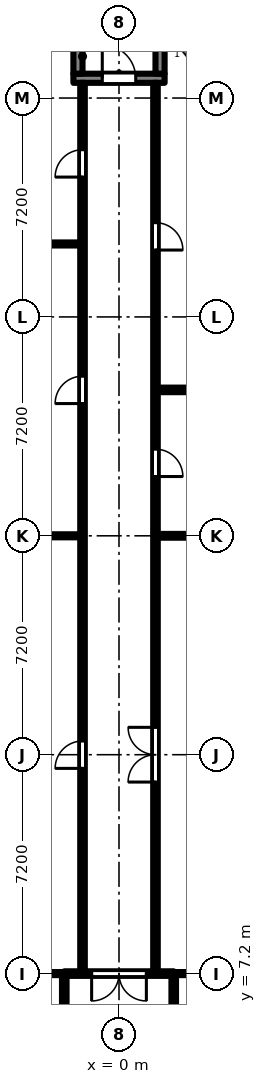
"""IFC4 building model, lengths in metres.
Left out: names, types, materials, properties, quantities, classifications, styles, units other than length and angle.
Written with IfcOpenShell. Run it as: python <this file> out.ifc"""

import sys

from ifc_helpers import new_model, si_unit, direction, frame, frame_2d, origin, place, context, subcontext, project, spatial, rectangle, extrude, element, fill, save


model = new_model("IFC4")
c1 = context("Model", 3, precision=1e-05, world=origin(), true_north=direction((0.0, 1.0)))
c2 = subcontext(c1, "Body", "Model", "MODEL_VIEW")
j1 = project(units=[si_unit("LENGTHUNIT", "METRE"), si_unit("PLANEANGLEUNIT", "RADIAN")], contexts=[c1])
p1 = place(None, origin())
s1 = spatial("IfcSite", under=j1, at=p1, CompositionType="ELEMENT")
p2 = place(p1, origin())
s2 = spatial("IfcBuilding", under=s1, at=p2, CompositionType="ELEMENT")
p3 = place(p2, frame((0.0, 0.0, 7.2)))
s3 = spatial("IfcBuildingStorey", under=s2, at=p3, CompositionType="ELEMENT", Elevation=7.2)
p4 = place(p3, frame((-1.5, 36.65, 0.0), z_axis=(0.0, 0.0, 1.0), x_axis=(1.0, 0.0, 0.0)))
e1 = element("IfcWall", 1, at=p4, inside=s3, PredefinedType="SHEAR", context=c2, shape_type="SweptSolid", body=[
    extrude(rectangle(XDim=3.0, YDim=0.3, at=frame_2d((1.5, 0.0))), origin(), (0.0, 0.0, 1.0), 4.075),
])
p5 = place(p4, frame((0.95, 0.0, 0.0)))
e2 = element("IfcOpeningElement", 2, at=p5, cuts=e1, PredefinedType="OPENING", context=c2, shape_type="SweptSolid", body=[
    extrude(rectangle(XDim=1.1, YDim=2.1, at=frame_2d((0.55, 1.05))), frame((0.0, 0.16, 0.0), z_axis=(0.0, -1.0, 0.0), x_axis=(1.0, 0.0, 0.0)), (0.0, 0.0, 1.0), 0.32),
])
for number, where, z_axis, x_axis in (
    (3, (-1.35, 36.8, 0.0), (0.0, 0.0, 1.0), (0.0, 1.0, 0.0)),
    (4, (1.35, 36.8, 0.0), (0.0, 0.0, 1.0), (0.0, 1.0, 0.0)),
):
    element("IfcWall", number, at=place(p3, frame(where, z_axis=z_axis, x_axis=x_axis)), inside=s3, PredefinedType="SHEAR", context=c2, shape_type="SweptSolid", body=[
        extrude(rectangle(XDim=5.8, YDim=0.3, at=frame_2d((2.9, 0.0))), origin(), (0.0, 0.0, 1.0), 4.075),
    ])
p6 = place(p3, frame((-6.9, 21.6, 0.0), z_axis=(0.0, 0.0, 1.0), x_axis=(1.0, 0.0, 0.0)))
e5 = element("IfcWall", 5, at=p6, inside=s3, PredefinedType="PARTITIONING", context=c2, shape_type="SweptSolid", body=[
    extrude(rectangle(XDim=5.625, YDim=0.1, at=frame_2d((2.812, 0.0))), origin(), (0.0, 0.0, 1.0), 4.075),
])
p7 = place(p3, frame((-7.02, 31.2, 0.0), z_axis=(0.0, 0.0, 1.0), x_axis=(1.0, 0.0, 0.0)))
e6 = element("IfcWall", 6, at=p7, inside=s3, PredefinedType="PARTITIONING", context=c2, shape_type="SweptSolid", body=[
    extrude(rectangle(XDim=5.745, YDim=0.1, at=frame_2d((2.873, 0.0))), origin(), (0.0, 0.0, 1.0), 4.075),
])
p8 = place(p3, frame((-1.8, 1.875, 0.0), z_axis=(0.0, 0.0, 1.0), x_axis=(0.0, 1.0, 0.0)))
e7 = element("IfcWall", 7, at=p8, inside=s3, PredefinedType="PARTITIONING", context=c2, shape_type="SweptSolid", body=[
    extrude(rectangle(XDim=5.25, YDim=0.15, at=frame_2d((2.625, 0.0))), origin(), (0.0, 0.0, 1.0), 4.075),
])
p9 = place(p8, frame((0.555, 0.0, 0.0)))
e8 = element("IfcOpeningElement", 8, at=p9, cuts=e7, PredefinedType="OPENING", context=c2, shape_type="SweptSolid", body=[
    extrude(rectangle(XDim=0.9, YDim=2.1, at=frame_2d((0.45, 1.05))), frame((0.0, 0.085, 0.0), z_axis=(0.0, -1.0, 0.0), x_axis=(1.0, 0.0, 0.0)), (0.0, 0.0, 1.0), 0.17),
])
p10 = place(p3, frame((-1.8, 7.2, 0.0), z_axis=(0.0, 0.0, 1.0), x_axis=(1.0, 0.0, 0.0)))
e9 = element("IfcWall", 9, at=p10, inside=s3, PredefinedType="PARTITIONING", context=c2, shape_type="SweptSolid", body=[
    extrude(rectangle(XDim=3.6, YDim=0.15, at=frame_2d((1.8, 0.0))), origin(), (0.0, 0.0, 1.0), 4.075),
])
p11 = place(p10, frame((0.9, 0.0, 0.0)))
e10 = element("IfcOpeningElement", 10, at=p11, cuts=e9, PredefinedType="OPENING", context=c2, shape_type="SweptSolid", body=[
    extrude(rectangle(XDim=1.8, YDim=2.1, at=frame_2d((0.9, 1.05))), frame((0.0, 0.085, 0.0), z_axis=(0.0, -1.0, 0.0), x_axis=(1.0, 0.0, 0.0)), (0.0, 0.0, 1.0), 0.17),
])
p12 = place(p3, frame((-1.2, 7.275, 0.0), z_axis=(0.0, 0.0, 1.0), x_axis=(0.0, 1.0, 0.0)))
e11 = element("IfcWall", 11, at=p12, inside=s3, PredefinedType="PARTITIONING", context=c2, shape_type="SweptSolid", body=[
    extrude(rectangle(XDim=29.225, YDim=0.15, at=frame_2d((14.613, 0.0))), origin(), (0.0, 0.0, 1.0), 4.075),
])
p13 = place(p12, frame((6.675, 0.0, 0.0)))
e12 = element("IfcOpeningElement", 12, at=p13, cuts=e11, PredefinedType="OPENING", context=c2, shape_type="SweptSolid", body=[
    extrude(rectangle(XDim=0.9, YDim=2.1, at=frame_2d((0.45, 1.05))), frame((0.0, 0.085, 0.0), z_axis=(0.0, -1.0, 0.0), x_axis=(1.0, 0.0, 0.0)), (0.0, 0.0, 1.0), 0.17),
])
p14 = place(p12, frame((18.675, 0.0, 0.0)))
e13 = element("IfcOpeningElement", 13, at=p14, cuts=e11, PredefinedType="OPENING", context=c2, shape_type="SweptSolid", body=[
    extrude(rectangle(XDim=0.9, YDim=2.1, at=frame_2d((0.45, 1.05))), frame((0.0, 0.085, 0.0), z_axis=(0.0, -1.0, 0.0), x_axis=(1.0, 0.0, 0.0)), (0.0, 0.0, 1.0), 0.17),
])
p15 = place(p12, frame((26.125, 0.0, 0.0)))
e14 = element("IfcOpeningElement", 14, at=p15, cuts=e11, PredefinedType="OPENING", context=c2, shape_type="SweptSolid", body=[
    extrude(rectangle(XDim=0.9, YDim=2.1, at=frame_2d((0.45, 1.05))), frame((0.0, 0.085, 0.0), z_axis=(0.0, -1.0, 0.0), x_axis=(1.0, 0.0, 0.0)), (0.0, 0.0, 1.0), 0.17),
])
p16 = place(p3, frame((1.2, 7.275, 0.0), z_axis=(0.0, 0.0, 1.0), x_axis=(0.0, 1.0, 0.0)))
e15 = element("IfcWall", 15, at=p16, inside=s3, PredefinedType="PARTITIONING", context=c2, shape_type="SweptSolid", body=[
    extrude(rectangle(XDim=29.225, YDim=0.15, at=frame_2d((14.613, 0.0))), origin(), (0.0, 0.0, 1.0), 4.075),
])
p17 = place(p16, frame((6.225, 0.0, 0.0)))
e16 = element("IfcOpeningElement", 16, at=p17, cuts=e15, PredefinedType="OPENING", context=c2, shape_type="SweptSolid", body=[
    extrude(rectangle(XDim=1.8, YDim=2.1, at=frame_2d((0.9, 1.05))), frame((0.0, 0.085, 0.0), z_axis=(0.0, -1.0, 0.0), x_axis=(1.0, 0.0, 0.0)), (0.0, 0.0, 1.0), 0.17),
])
p18 = place(p16, frame((16.275, 0.0, 0.0)))
e17 = element("IfcOpeningElement", 17, at=p18, cuts=e15, PredefinedType="OPENING", context=c2, shape_type="SweptSolid", body=[
    extrude(rectangle(XDim=0.9, YDim=2.1, at=frame_2d((0.45, 1.05))), frame((0.0, 0.085, 0.0), z_axis=(0.0, -1.0, 0.0), x_axis=(1.0, 0.0, 0.0)), (0.0, 0.0, 1.0), 0.17),
])
p19 = place(p16, frame((23.725, 0.0, 0.0)))
e18 = element("IfcOpeningElement", 18, at=p19, cuts=e15, PredefinedType="OPENING", context=c2, shape_type="SweptSolid", body=[
    extrude(rectangle(XDim=0.9, YDim=2.1, at=frame_2d((0.45, 1.05))), frame((0.0, 0.085, 0.0), z_axis=(0.0, -1.0, 0.0), x_axis=(1.0, 0.0, 0.0)), (0.0, 0.0, 1.0), 0.17),
])
p20 = place(p3, frame((1.275, 21.6, 0.0), z_axis=(0.0, 0.0, 1.0), x_axis=(1.0, 0.0, 0.0)))
e19 = element("IfcWall", 19, at=p20, inside=s3, PredefinedType="PARTITIONING", context=c2, shape_type="SweptSolid", body=[
    extrude(rectangle(XDim=5.625, YDim=0.125, at=frame_2d((2.812, 0.0))), origin(), (0.0, 0.0, 1.0), 4.075),
])
p21 = place(p3, frame((1.275, 26.4, 0.0), z_axis=(0.0, 0.0, 1.0), x_axis=(1.0, 0.0, 0.0)))
e20 = element("IfcWall", 20, at=p21, inside=s3, PredefinedType="PARTITIONING", context=c2, shape_type="SweptSolid", body=[
    extrude(rectangle(XDim=5.745, YDim=0.15, at=frame_2d((2.873, 0.0))), origin(), (0.0, 0.0, 1.0), 4.075),
])
p22 = place(p3, frame((1.8, 1.725, 0.0), z_axis=(0.0, 0.0, 1.0), x_axis=(0.0, 1.0, 0.0)))
e21 = element("IfcWall", 21, at=p22, inside=s3, PredefinedType="PARTITIONING", context=c2, shape_type="SweptSolid", body=[
    extrude(rectangle(XDim=5.4, YDim=0.15, at=frame_2d((2.7, 0.0))), origin(), (0.0, 0.0, 1.0), 4.075),
])
p23 = place(p22, frame((0.175, 0.0, 0.0)))
e22 = element("IfcOpeningElement", 22, at=p23, cuts=e21, PredefinedType="OPENING", context=c2, shape_type="SweptSolid", body=[
    extrude(rectangle(XDim=0.9, YDim=2.1, at=frame_2d((0.45, 1.05))), frame((0.0, 0.085, 0.0), z_axis=(0.0, -1.0, 0.0), x_axis=(1.0, 0.0, 0.0)), (0.0, 0.0, 1.0), 0.17),
])
for number, where, z_axis, x_axis in (
    (23, (1.8, 7.2, 0.0), (0.0, 0.0, 1.0), (1.0, 0.0, 0.0)),
    (24, (-3.75, 7.2, 0.0), (0.0, 0.0, 1.0), (1.0, 0.0, 0.0)),
):
    element("IfcWall", number, at=place(p3, frame(where, z_axis=z_axis, x_axis=x_axis)), inside=s3, PredefinedType="PARTITIONING", context=c2, shape_type="SweptSolid", body=[
        extrude(rectangle(XDim=1.95, YDim=0.1, at=frame_2d((0.975, 0.0))), origin(), (0.0, 0.0, 1.0), 4.075),
    ])
p24 = place(p5, origin())
e25 = element("IfcDoor", 25, at=p24, inside=s3, OperationType="SINGLE_SWING_LEFT", PredefinedType="DOOR", context=c2, shape_type="SweptSolid", body=[
    extrude(rectangle(XDim=1.1, YDim=2.1, at=frame_2d((0.55, 1.05))), frame((0.0, 0.025, 0.0), z_axis=(0.0, -1.0, 0.0), x_axis=(1.0, 0.0, 0.0)), (0.0, 0.0, 1.0), 0.05),
])
fill(e2, e25)
p25 = place(p11, frame((1.8, 0.0, 0.0), z_axis=(0.0, 0.0, 1.0), x_axis=(-1.0, 0.0, 0.0)))
e26 = element("IfcDoor", 26, at=p25, inside=s3, OperationType="DOUBLE_DOOR_DOUBLE_SWING", PredefinedType="DOOR", context=c2, shape_type="SweptSolid", body=[
    extrude(rectangle(XDim=1.8, YDim=2.1, at=frame_2d((0.9, 1.05))), frame((0.0, 0.025, 0.0), z_axis=(0.0, -1.0, 0.0), x_axis=(1.0, 0.0, 0.0)), (0.0, 0.0, 1.0), 0.05),
])
fill(e10, e26)
p26 = place(p13, origin())
e27 = element("IfcDoor", 27, at=p26, inside=s3, OperationType="SINGLE_SWING_LEFT", PredefinedType="DOOR", context=c2, shape_type="SweptSolid", body=[
    extrude(rectangle(XDim=0.9, YDim=2.1, at=frame_2d((0.45, 1.05))), frame((0.0, 0.025, 0.0), z_axis=(0.0, -1.0, 0.0), x_axis=(1.0, 0.0, 0.0)), (0.0, 0.0, 1.0), 0.05),
])
fill(e12, e27)
p27 = place(p14, origin())
e28 = element("IfcDoor", 28, at=p27, inside=s3, OperationType="SINGLE_SWING_LEFT", PredefinedType="DOOR", context=c2, shape_type="SweptSolid", body=[
    extrude(rectangle(XDim=0.9, YDim=2.1, at=frame_2d((0.45, 1.05))), frame((0.0, 0.025, 0.0), z_axis=(0.0, -1.0, 0.0), x_axis=(1.0, 0.0, 0.0)), (0.0, 0.0, 1.0), 0.05),
])
fill(e13, e28)
p28 = place(p15, origin())
e29 = element("IfcDoor", 29, at=p28, inside=s3, OperationType="SINGLE_SWING_LEFT", PredefinedType="DOOR", context=c2, shape_type="SweptSolid", body=[
    extrude(rectangle(XDim=0.9, YDim=2.1, at=frame_2d((0.45, 1.05))), frame((0.0, 0.025, 0.0), z_axis=(0.0, -1.0, 0.0), x_axis=(1.0, 0.0, 0.0)), (0.0, 0.0, 1.0), 0.05),
])
fill(e14, e29)
p29 = place(p17, origin())
e30 = element("IfcDoor", 30, at=p29, inside=s3, OperationType="DOUBLE_DOOR_DOUBLE_SWING", PredefinedType="DOOR", context=c2, shape_type="SweptSolid", body=[
    extrude(rectangle(XDim=1.8, YDim=2.1, at=frame_2d((0.9, 1.05))), frame((0.0, 0.025, 0.0), z_axis=(0.0, -1.0, 0.0), x_axis=(1.0, 0.0, 0.0)), (0.0, 0.0, 1.0), 0.05),
])
fill(e16, e30)
p30 = place(p18, frame((0.9, 0.0, 0.0), z_axis=(0.0, 0.0, 1.0), x_axis=(-1.0, 0.0, 0.0)))
e31 = element("IfcDoor", 31, at=p30, inside=s3, OperationType="SINGLE_SWING_RIGHT", PredefinedType="DOOR", context=c2, shape_type="SweptSolid", body=[
    extrude(rectangle(XDim=0.9, YDim=2.1, at=frame_2d((0.45, 1.05))), frame((0.0, 0.025, 0.0), z_axis=(0.0, -1.0, 0.0), x_axis=(1.0, 0.0, 0.0)), (0.0, 0.0, 1.0), 0.05),
])
fill(e17, e31)
p31 = place(p19, frame((0.9, 0.0, 0.0), z_axis=(0.0, 0.0, 1.0), x_axis=(-1.0, 0.0, 0.0)))
e32 = element("IfcDoor", 32, at=p31, inside=s3, OperationType="SINGLE_SWING_RIGHT", PredefinedType="DOOR", context=c2, shape_type="SweptSolid", body=[
    extrude(rectangle(XDim=0.9, YDim=2.1, at=frame_2d((0.45, 1.05))), frame((0.0, 0.025, 0.0), z_axis=(0.0, -1.0, 0.0), x_axis=(1.0, 0.0, 0.0)), (0.0, 0.0, 1.0), 0.05),
])
fill(e18, e32)
save(model, sys.argv[1])
